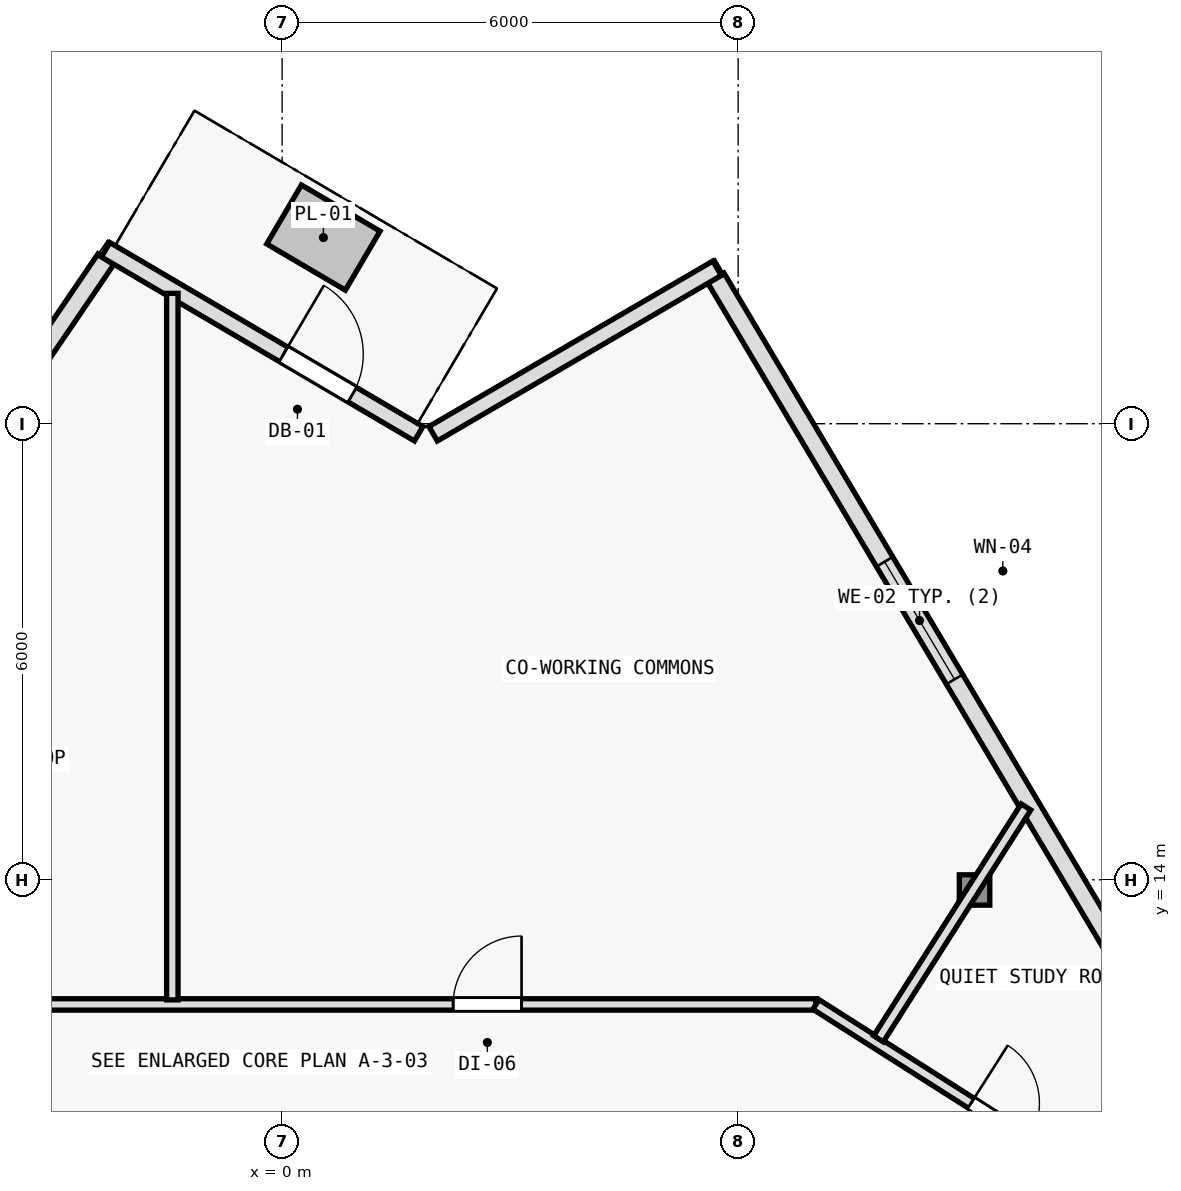
"""IFC4 building model, lengths in metres.
Left out: names, types, materials, properties, quantities, classifications, styles, units other than length and angle.
Written with IfcOpenShell. Run it as: python <this file> out.ifc"""

import sys

from ifc_helpers import new_model, si_unit, direction, frame, frame_2d, origin, origin_2d, place, context, subcontext, project, spatial, rectangle, i_section, extrude, element, fill, save


model = new_model("IFC4")
c1 = context("Model", 3, precision=1e-05, world=origin(), true_north=direction((0.0, 1.0)))
c2 = subcontext(c1, "Body", "Model", "MODEL_VIEW")
j1 = project(units=[si_unit("LENGTHUNIT", "METRE"), si_unit("PLANEANGLEUNIT", "RADIAN")], contexts=[c1])
p1 = place(None, origin())
s1 = spatial("IfcSite", under=j1, at=p1, CompositionType="ELEMENT")
p2 = place(p1, origin())
s2 = spatial("IfcBuilding", under=s1, at=p2, CompositionType="ELEMENT")
p3 = place(p2, frame((0.0, 0.0, 181.8)))
s3 = spatial("IfcBuildingStorey", under=s2, at=p3, CompositionType="ELEMENT", Elevation=181.8)
p4 = place(p3, frame((9.11, 13.866, 0.005), z_axis=(-0.011699046613, -0.002516655376, 0.999928396814), x_axis=(0.210305364179, -0.977635746993, 0.0)))
e1 = element("IfcColumn", 1, at=p4, inside=s3, PredefinedType="COLUMN", context=c2, shape_type="SweptSolid", body=[
    extrude(i_section(OverallWidth=0.401, OverallDepth=0.399, WebThickness=0.016, FlangeThickness=0.025, FilletRadius=0.015, at=origin_2d()), origin(), (0.0, 0.0, 1.0), 3.589),
])
p5 = place(p3, frame((5.706, 21.919, 0.0), z_axis=(0.0, 0.0, 1.0), x_axis=(0.511079110892, -0.859533677298, 0.0)))
e2 = element("IfcWall", 2, at=p5, inside=s3, PredefinedType="SOLIDWALL", context=c2, shape_type="SweptSolid", body=[
    extrude(rectangle(XDim=10.489, YDim=0.25, at=frame_2d((5.245, 0.0))), origin(), (0.0, 0.0, 1.0), 3.28),
])
p6 = place(p5, frame((4.344, 0.0, 0.62)))
e3 = element("IfcOpeningElement", 3, at=p6, cuts=e2, PredefinedType="OPENING", context=c2, shape_type="SweptSolid", body=[
    extrude(rectangle(XDim=1.8, YDim=2.1, at=frame_2d((0.9, 1.05))), frame((0.0, 0.135, 0.0), z_axis=(0.0, -1.0, 0.0), x_axis=(1.0, 0.0, 0.0)), (0.0, 0.0, 1.0), 0.27),
])
p7 = place(p3, frame((-8.517, 13.053, 0.0), z_axis=(0.0, 0.0, 1.0), x_axis=(0.562463961516, 0.826821801838, 0.0)))
e4 = element("IfcWall", 4, at=p7, inside=s3, PredefinedType="SOLIDWALL", context=c2, shape_type="SweptSolid", body=[
    extrude(rectangle(XDim=11.018, YDim=0.25, at=frame_2d((5.509, 0.0))), origin(), (0.0, 0.0, 1.0), 3.28),
])
p8 = place(p7, frame((4.809, 0.0, 0.62)))
e5 = element("IfcOpeningElement", 5, at=p8, cuts=e4, PredefinedType="OPENING", context=c2, shape_type="SweptSolid", body=[
    extrude(rectangle(XDim=1.4, YDim=2.0, at=frame_2d((0.7, 1.0))), frame((0.0, 0.135, 0.0), z_axis=(0.0, -1.0, 0.0), x_axis=(1.0, 0.0, 0.0)), (0.0, 0.0, 1.0), 0.27),
])
p9 = place(p3, frame((1.987, 19.868, 0.0), z_axis=(0.0, 0.0, 1.0), x_axis=(0.863979520686, 0.503526948469, 0.0)))
e6 = element("IfcWall", 6, at=p9, inside=s3, PredefinedType="SOLIDWALL", context=c2, shape_type="SweptSolid", body=[
    extrude(rectangle(XDim=4.324, YDim=0.22, at=frame_2d((2.162, 0.0))), origin(), (0.0, 0.0, 1.0), 3.28),
])
p10 = place(p3, frame((-2.322, 22.289, 0.0), z_axis=(0.0, 0.0, 1.0), x_axis=(0.862111523483, -0.506718581738, 0.0)))
e7 = element("IfcWall", 7, at=p10, inside=s3, PredefinedType="SOLIDWALL", context=c2, shape_type="SweptSolid", body=[
    extrude(rectangle(XDim=4.777, YDim=0.22, at=frame_2d((2.389, 0.0))), origin(), (0.0, 0.0, 1.0), 3.28),
])
p11 = place(p10, frame((2.714, 0.0, 0.0)))
e8 = element("IfcOpeningElement", 8, at=p11, cuts=e7, PredefinedType="OPENING", context=c2, shape_type="SweptSolid", body=[
    extrude(rectangle(XDim=1.05, YDim=2.15, at=frame_2d((0.525, 1.075))), frame((0.0, 0.12, 0.0), z_axis=(0.0, -1.0, 0.0), x_axis=(1.0, 0.0, 0.0)), (0.0, 0.0, 1.0), 0.24),
])
p12 = place(p3, frame((-7.041, 12.36, 0.0), z_axis=(0.0, 0.0, 1.0), x_axis=(1.0, 0.0, 0.0)))
e9 = element("IfcWall", 9, at=p12, inside=s3, PredefinedType="PARTITIONING", context=c2, shape_type="SweptSolid", body=[
    extrude(rectangle(XDim=14.064, YDim=0.15, at=frame_2d((7.032, 0.0))), origin(), (0.0, 0.0, 1.0), 2.935),
])
p13 = place(p12, frame((9.292, 0.0, 0.0)))
e10 = element("IfcOpeningElement", 10, at=p13, cuts=e9, PredefinedType="OPENING", context=c2, shape_type="SweptSolid", body=[
    extrude(rectangle(XDim=0.9, YDim=2.1, at=frame_2d((0.45, 1.05))), frame((0.0, 0.085, 0.0), z_axis=(0.0, -1.0, 0.0), x_axis=(1.0, 0.0, 0.0)), (0.0, 0.0, 1.0), 0.17),
])
p14 = place(p12, frame((2.438, 0.0, 0.0)))
e11 = element("IfcOpeningElement", 11, at=p14, cuts=e9, PredefinedType="OPENING", context=c2, shape_type="SweptSolid", body=[
    extrude(rectangle(XDim=0.9, YDim=2.1, at=frame_2d((0.45, 1.05))), frame((0.0, 0.085, 0.0), z_axis=(0.0, -1.0, 0.0), x_axis=(1.0, 0.0, 0.0)), (0.0, 0.0, 1.0), 0.17),
])
p15 = place(p3, frame((7.023, 12.36, 0.0), z_axis=(0.0, 0.0, 1.0), x_axis=(0.84376480085, -0.536713108511, 0.0)))
e12 = element("IfcWall", 12, at=p15, inside=s3, PredefinedType="PARTITIONING", context=c2, shape_type="SweptSolid", body=[
    extrude(rectangle(XDim=7.297, YDim=0.15, at=frame_2d((3.648, 0.0))), origin(), (0.0, 0.0, 1.0), 2.705),
])
p16 = place(p15, frame((2.419, 0.0, 0.0)))
e13 = element("IfcOpeningElement", 13, at=p16, cuts=e12, PredefinedType="OPENING", context=c2, shape_type="SweptSolid", body=[
    extrude(rectangle(XDim=0.9, YDim=2.1, at=frame_2d((0.45, 1.05))), frame((0.0, 0.085, 0.0), z_axis=(0.0, -1.0, 0.0), x_axis=(1.0, 0.0, 0.0)), (0.0, 0.0, 1.0), 0.17),
])
p17 = place(p3, frame((7.846, 11.907, 0.0), z_axis=(0.0, 0.0, 1.0), x_axis=(0.536683232566, 0.843783803994, 0.0)))
e14 = element("IfcWall", 14, at=p17, inside=s3, PredefinedType="PARTITIONING", context=c2, shape_type="SweptSolid", body=[
    extrude(rectangle(XDim=3.615, YDim=0.15, at=frame_2d((1.808, 0.0))), origin(), (0.0, 0.0, 1.0), 2.865),
])
p18 = place(p3, frame((-1.445, 12.42, 0.0), z_axis=(0.0, 0.0, 1.0), x_axis=(0.0, 1.0, 0.0)))
e15 = element("IfcWall", 15, at=p18, inside=s3, PredefinedType="PARTITIONING", context=c2, shape_type="SweptSolid", body=[
    extrude(rectangle(XDim=9.295, YDim=0.15, at=frame_2d((4.647, 0.0))), origin(), (0.0, 0.0, 1.0), 2.865),
])
p19 = place(p6, origin())
e16 = element("IfcWindow", 16, at=p19, inside=s3, PartitioningType="SINGLE_PANEL", PredefinedType="WINDOW", context=c2, shape_type="SweptSolid", body=[
    extrude(rectangle(XDim=1.8, YDim=2.1, at=frame_2d((0.9, 1.05))), frame((0.0, 0.03, 0.0), z_axis=(0.0, -1.0, 0.0), x_axis=(1.0, 0.0, 0.0)), (0.0, 0.0, 1.0), 0.06),
])
fill(e3, e16)
p20 = place(p11, origin())
e17 = element("IfcDoor", 17, at=p20, inside=s3, OperationType="SINGLE_SWING_LEFT", PredefinedType="DOOR", context=c2, shape_type="SweptSolid", body=[
    extrude(rectangle(XDim=1.05, YDim=2.15, at=frame_2d((0.525, 1.075))), frame((0.0, 0.025, 0.0), z_axis=(0.0, -1.0, 0.0), x_axis=(1.0, 0.0, 0.0)), (0.0, 0.0, 1.0), 0.05),
])
fill(e8, e17)
p21 = place(p16, origin())
e18 = element("IfcDoor", 18, at=p21, inside=s3, OperationType="SINGLE_SWING_LEFT", PredefinedType="DOOR", context=c2, shape_type="SweptSolid", body=[
    extrude(rectangle(XDim=0.9, YDim=2.1, at=frame_2d((0.45, 1.05))), frame((0.0, 0.025, 0.0), z_axis=(0.0, -1.0, 0.0), x_axis=(1.0, 0.0, 0.0)), (0.0, 0.0, 1.0), 0.05),
])
fill(e13, e18)
p22 = place(p13, origin())
e19 = element("IfcDoor", 19, at=p22, inside=s3, OperationType="SINGLE_SWING_RIGHT", PredefinedType="DOOR", context=c2, shape_type="SweptSolid", body=[
    extrude(rectangle(XDim=0.9, YDim=2.1, at=frame_2d((0.45, 1.05))), frame((0.0, 0.025, 0.0), z_axis=(0.0, -1.0, 0.0), x_axis=(1.0, 0.0, 0.0)), (0.0, 0.0, 1.0), 0.05),
])
fill(e10, e19)
save(model, sys.argv[1])
